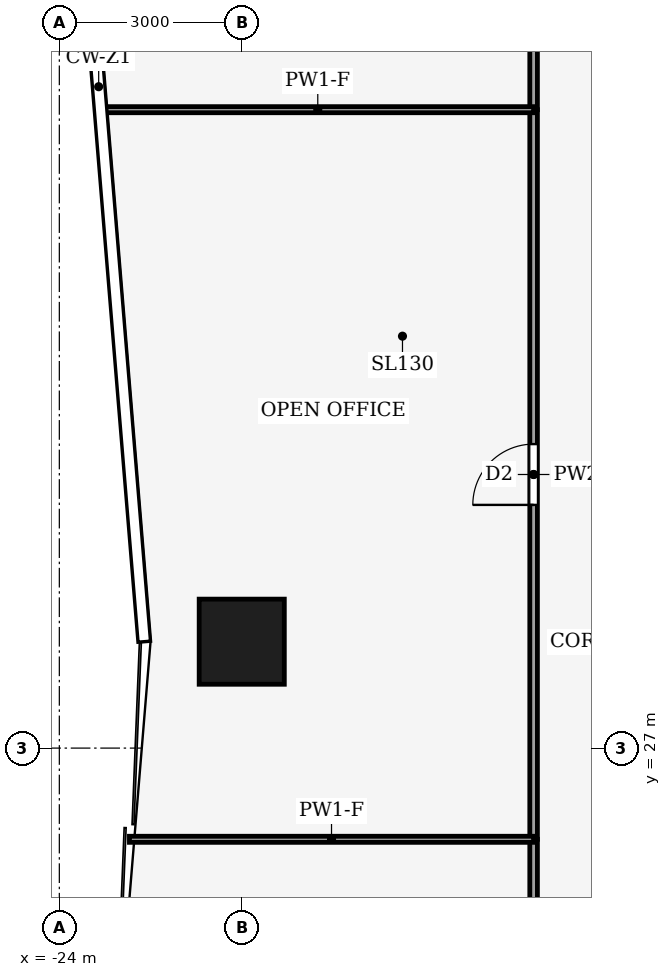
"""IFC4 building model, lengths in metres.
Left out: names, types, materials, properties, quantities, classifications, styles, units other than length and angle.
Written with IfcOpenShell. Run it as: python <this file> out.ifc"""

import sys

from ifc_helpers import new_model, si_unit, direction, frame, frame_2d, origin, origin_2d, place, context, subcontext, project, spatial, rectangle, hollow_rectangle, extrude, element, fill, save


model = new_model("IFC4")
c1 = context("Model", 3, precision=1e-05, world=origin(), true_north=direction((0.0, 1.0)))
c2 = subcontext(c1, "Body", "Model", "MODEL_VIEW")
j1 = project(units=[si_unit("LENGTHUNIT", "METRE"), si_unit("PLANEANGLEUNIT", "RADIAN")], contexts=[c1])
p1 = place(None, origin())
s1 = spatial("IfcSite", under=j1, at=p1, CompositionType="ELEMENT")
p2 = place(p1, origin())
s2 = spatial("IfcBuilding", under=s1, at=p2, CompositionType="ELEMENT")
p3 = place(p2, frame((0.0, 0.0, 90.0)))
s3 = spatial("IfcBuildingStorey", under=s2, at=p3, CompositionType="ELEMENT", Elevation=90.0)
p4 = place(p3, frame((-21.0, 28.75, 0.0), z_axis=(0.0, 0.0, 1.0), x_axis=(1.0, 0.0, 0.0)))
e1 = element("IfcColumn", 1, at=p4, inside=s3, PredefinedType="COLUMN", context=c2, shape_type="SweptSolid", body=[
    extrude(hollow_rectangle(XDim=1.4, YDim=1.4, WallThickness=0.08, at=origin_2d()), origin(), (0.0, 0.0, 1.0), 4.0),
])
p5 = place(p3, frame((-16.2, 16.5, 0.0), z_axis=(0.0, 0.0, 1.0), x_axis=(0.0, 1.0, 0.0)))
e2 = element("IfcWall", 2, at=p5, inside=s3, PredefinedType="PARTITIONING", context=c2, shape_type="SweptSolid", body=[
    extrude(rectangle(XDim=9.0, YDim=0.125, at=frame_2d((4.5, 0.0))), origin(), (0.0, 0.0, 1.0), 3.14),
])
p6 = place(p5, frame((4.0, 0.0, 0.0)))
e3 = element("IfcOpeningElement", 3, at=p6, cuts=e2, PredefinedType="OPENING", context=c2, shape_type="SweptSolid", body=[
    extrude(rectangle(XDim=1.0, YDim=2.1, at=frame_2d((0.5, 1.05))), frame((0.0, 0.073, 0.0), z_axis=(0.0, -1.0, 0.0), x_axis=(1.0, 0.0, 0.0)), (0.0, 0.0, 1.0), 0.145),
])
p7 = place(p3, frame((-16.2, 25.5, 0.0), z_axis=(0.0, 0.0, 1.0), x_axis=(0.0, 1.0, 0.0)))
e4 = element("IfcWall", 4, at=p7, inside=s3, PredefinedType="PARTITIONING", context=c2, shape_type="SweptSolid", body=[
    extrude(rectangle(XDim=12.0, YDim=0.125, at=frame_2d((6.0, 0.0))), origin(), (0.0, 0.0, 1.0), 3.48),
])
p8 = place(p7, frame((5.5, 0.0, 0.0)))
e5 = element("IfcOpeningElement", 5, at=p8, cuts=e4, PredefinedType="OPENING", context=c2, shape_type="SweptSolid", body=[
    extrude(rectangle(XDim=1.0, YDim=2.1, at=frame_2d((0.5, 1.05))), frame((0.0, 0.073, 0.0), z_axis=(0.0, -1.0, 0.0), x_axis=(1.0, 0.0, 0.0)), (0.0, 0.0, 1.0), 0.145),
])
p9 = place(p3, frame((-16.2, 37.5, 0.0), z_axis=(0.0, 0.0, 1.0), x_axis=(0.0, 1.0, 0.0)))
e6 = element("IfcWall", 6, at=p9, inside=s3, PredefinedType="PARTITIONING", context=c2, shape_type="SweptSolid", body=[
    extrude(rectangle(XDim=12.0, YDim=0.125, at=frame_2d((6.0, 0.0))), origin(), (0.0, 0.0, 1.0), 3.14),
])
p10 = place(p9, frame((5.5, 0.0, 0.0)))
e7 = element("IfcOpeningElement", 7, at=p10, cuts=e6, PredefinedType="OPENING", context=c2, shape_type="SweptSolid", body=[
    extrude(rectangle(XDim=1.0, YDim=2.1, at=frame_2d((0.5, 1.05))), frame((0.0, 0.073, 0.0), z_axis=(0.0, -1.0, 0.0), x_axis=(1.0, 0.0, 0.0)), (0.0, 0.0, 1.0), 0.145),
])
p11 = place(p3, frame((-16.2, 25.5, 0.0), z_axis=(0.0, 0.0, 1.0), x_axis=(-1.0, 0.0, 0.0)))
e8 = element("IfcWall", 8, at=p11, inside=s3, PredefinedType="PARTITIONING", context=c2, shape_type="SweptSolid", body=[
    extrude(rectangle(XDim=6.647, YDim=0.1, at=frame_2d((3.324, 0.0))), origin(), (0.0, 0.0, 1.0), 3.04),
])
p12 = place(p3, frame((-16.2, 37.5, 0.0), z_axis=(0.0, 0.0, 1.0), x_axis=(-1.0, 0.0, 0.0)))
e9 = element("IfcWall", 9, at=p12, inside=s3, PredefinedType="PARTITIONING", context=c2, shape_type="SweptSolid", body=[
    extrude(rectangle(XDim=7.099, YDim=0.1, at=frame_2d((3.55, 0.0))), origin(), (0.0, 0.0, 1.0), 3.04),
])
p13 = place(p8, origin())
e10 = element("IfcDoor", 10, at=p13, inside=s3, OperationType="SINGLE_SWING_RIGHT", PredefinedType="DOOR", context=c2, shape_type="SweptSolid", body=[
    extrude(rectangle(XDim=1.0, YDim=2.1, at=frame_2d((0.5, 1.05))), frame((0.0, 0.025, 0.0), z_axis=(0.0, -1.0, 0.0), x_axis=(1.0, 0.0, 0.0)), (0.0, 0.0, 1.0), 0.05),
])
fill(e5, e10)
save(model, sys.argv[1])
